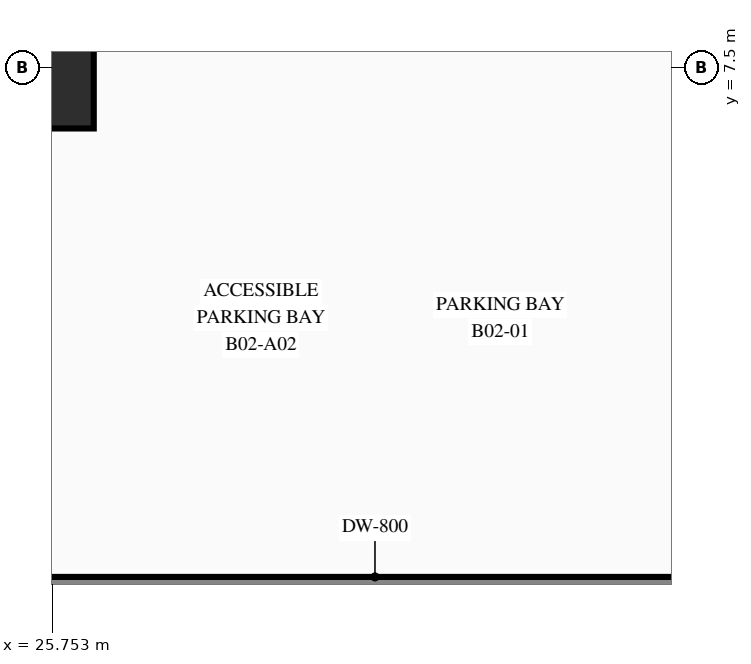
"""IFC4 building model, lengths in metres.
Left out: names, types, materials, properties, quantities, classifications, styles, units other than length and angle.
Written with IfcOpenShell. Run it as: python <this file> out.ifc"""

import sys

from ifc_helpers import new_model, si_unit, direction, frame, frame_2d, origin, origin_2d, place, context, subcontext, project, spatial, rectangle, extrude, element, save


model = new_model("IFC4")
c1 = context("Model", 3, precision=1e-05, world=origin(), true_north=direction((0.0, 1.0)))
c2 = subcontext(c1, "Body", "Model", "MODEL_VIEW")
j1 = project(units=[si_unit("LENGTHUNIT", "METRE"), si_unit("PLANEANGLEUNIT", "RADIAN")], contexts=[c1])
p1 = place(None, origin())
s1 = spatial("IfcSite", under=j1, at=p1, CompositionType="ELEMENT")
p2 = place(p1, origin())
s2 = spatial("IfcBuilding", under=s1, at=p2, CompositionType="ELEMENT")
p3 = place(p2, frame((0.0, 0.0, -9.0)))
s3 = spatial("IfcBuildingStorey", under=s2, at=p3, CompositionType="ELEMENT", Elevation=-9.0)
p4 = place(p3, frame((0.0, 0.4, 0.0), z_axis=(0.0, 0.0, 1.0), x_axis=(1.0, 0.0, 0.0)))
e1 = element("IfcWall", 1, at=p4, inside=s3, PredefinedType="USERDEFINED", context=c2, shape_type="SweptSolid", body=[
    extrude(rectangle(XDim=60.0, YDim=0.8, at=frame_2d((30.0, 0.0))), origin(), (0.0, 0.0, 1.0), 4.5),
])
p5 = place(p3, frame((25.5, 7.5, 0.0), z_axis=(0.0, 0.0, 1.0), x_axis=(1.0, 0.0, 0.0)))
e2 = element("IfcColumn", 2, at=p5, inside=s3, PredefinedType="COLUMN", context=c2, shape_type="SweptSolid", body=[
    extrude(rectangle(XDim=1.6, YDim=1.6, at=origin_2d()), origin(), (0.0, 0.0, 1.0), 4.5),
])
save(model, sys.argv[1])
